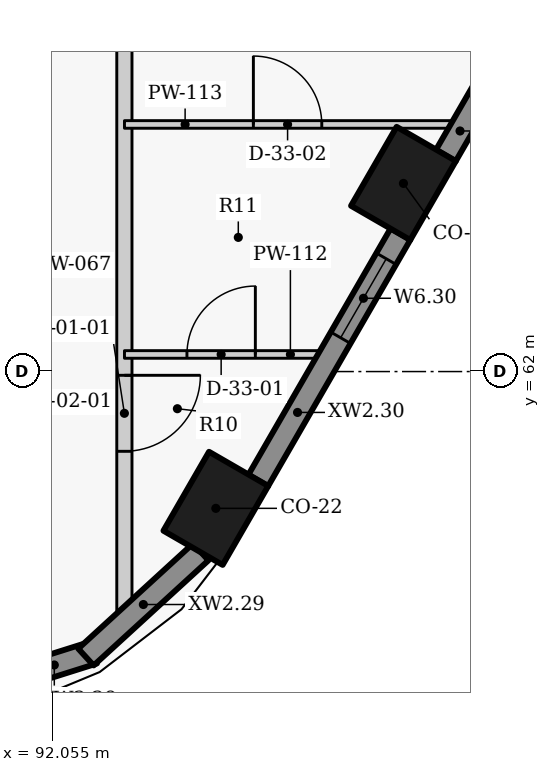
"""IFC4 building model, lengths in metres.
Left out: names, types, materials, properties, quantities, classifications, styles, units other than length and angle.
Written with IfcOpenShell. Run it as: python <this file> out.ifc"""

import sys

from ifc_helpers import new_model, si_unit, direction, frame, frame_2d, origin, origin_2d, place, context, subcontext, project, spatial, rectangle, extrude, element, fill, save


model = new_model("IFC4")
c1 = context("Model", 3, precision=1e-05, world=origin(), true_north=direction((0.0, 1.0)))
c2 = subcontext(c1, "Body", "Model", "MODEL_VIEW")
j1 = project(units=[si_unit("LENGTHUNIT", "METRE"), si_unit("PLANEANGLEUNIT", "RADIAN")], contexts=[c1])
p1 = place(None, origin())
s1 = spatial("IfcSite", under=j1, at=p1, CompositionType="ELEMENT")
p2 = place(p1, origin())
s2 = spatial("IfcBuilding", under=s1, at=p2, CompositionType="ELEMENT")
p3 = place(p2, frame((0.0, 0.0, 183.3)))
s3 = spatial("IfcBuildingStorey", under=s2, at=p3, CompositionType="ELEMENT", Elevation=183.3)
for number, where, z_axis, x_axis in (
    (1, (94.203, 60.2, 0.0), (0.0, 0.0, 1.0), (0.5, 0.866, 0.0)),
    (2, (96.671, 64.475, 0.0), (0.0, 0.0, 1.0), (0.5, 0.866, 0.0)),
):
    element("IfcColumn", number, at=place(p3, frame(where, z_axis=z_axis, x_axis=x_axis)), inside=s3, PredefinedType="COLUMN", context=c2, shape_type="SweptSolid", body=[
        extrude(rectangle(XDim=1.2, YDim=0.9, at=origin_2d()), origin(), (0.0, 0.0, 1.0), 3.3),
    ])
p4 = place(p3, frame((90.636, 57.685, 0.0), z_axis=(0.0, 0.0, 1.0), x_axis=(0.95368324118, 0.300812691707, 0.0)))
e3 = element("IfcWall", 3, at=p4, inside=s3, PredefinedType="SOLIDWALL", context=c2, shape_type="SweptSolid", body=[
    extrude(rectangle(XDim=2.053, YDim=0.3, at=frame_2d((1.027, 0.0))), origin(), (0.0, 0.0, 1.0), 2.425),
])
p5 = place(p4, frame((0.271, 0.0, 0.9)))
e4 = element("IfcOpeningElement", 4, at=p5, cuts=e3, PredefinedType="OPENING", context=c2, shape_type="SweptSolid", body=[
    extrude(rectangle(XDim=0.6, YDim=1.1, at=frame_2d((0.3, 0.55))), frame((0.0, 0.16, 0.0), z_axis=(0.0, -1.0, 0.0), x_axis=(1.0, 0.0, 0.0)), (0.0, 0.0, 1.0), 0.32),
])
p6 = place(p3, frame((92.494, 58.244, 0.0), z_axis=(0.0, 0.0, 1.0), x_axis=(0.73764876128, 0.675184645102, 0.0)))
e5 = element("IfcWall", 5, at=p6, inside=s3, PredefinedType="SOLIDWALL", context=c2, shape_type="SweptSolid", body=[
    extrude(rectangle(XDim=2.048, YDim=0.3, at=frame_2d((1.024, 0.0))), origin(), (0.0, 0.0, 1.0), 2.425),
])
p7 = place(p3, frame((94.761, 60.567, 0.0), z_axis=(0.0, 0.0, 1.0), x_axis=(0.499982088007, 0.866035745032, 0.0)))
e6 = element("IfcWall", 6, at=p7, inside=s3, PredefinedType="SOLIDWALL", context=c2, shape_type="SweptSolid", body=[
    extrude(rectangle(XDim=3.744, YDim=0.3, at=frame_2d((1.872, 0.0))), origin(), (0.0, 0.0, 1.0), 2.425),
])
p8 = place(p7, frame((2.169, 0.0, 0.9)))
e7 = element("IfcOpeningElement", 7, at=p8, cuts=e6, PredefinedType="OPENING", context=c2, shape_type="SweptSolid", body=[
    extrude(rectangle(XDim=1.2, YDim=1.1, at=frame_2d((0.6, 0.55))), frame((0.0, 0.16, 0.0), z_axis=(0.0, -1.0, 0.0), x_axis=(1.0, 0.0, 0.0)), (0.0, 0.0, 1.0), 0.32),
])
p9 = place(p3, frame((97.229, 64.842, 0.0), z_axis=(0.0, 0.0, 1.0), x_axis=(0.500059225181, 0.86599120741, 0.0)))
e8 = element("IfcWall", 8, at=p9, inside=s3, PredefinedType="SOLIDWALL", context=c2, shape_type="SweptSolid", body=[
    extrude(rectangle(XDim=3.744, YDim=0.3, at=frame_2d((1.872, 0.0))), origin(), (0.0, 0.0, 1.0), 2.425),
])
p10 = place(p9, frame((0.847, 0.0, 0.0)))
e9 = element("IfcOpeningElement", 9, at=p10, cuts=e8, PredefinedType="OPENING", context=c2, shape_type="SweptSolid", body=[
    extrude(rectangle(XDim=2.4, YDim=2.0, at=frame_2d((1.2, 1.0))), frame((0.0, 0.16, 0.0), z_axis=(0.0, -1.0, 0.0), x_axis=(1.0, 0.0, 0.0)), (0.0, 0.0, 1.0), 0.32),
])
p11 = place(p3, frame((93.0, 101.281, 0.0), z_axis=(0.0, 0.0, 1.0), x_axis=(0.0, -1.0, 0.0)))
e10 = element("IfcWall", 10, at=p11, inside=s3, PredefinedType="PARTITIONING", context=c2, shape_type="SweptSolid", body=[
    extrude(rectangle(XDim=42.606, YDim=0.2, at=frame_2d((21.303, 0.0))), origin(), (0.0, 0.0, 1.0), 2.405),
])
p12 = place(p11, frame((39.33, 0.0, 0.0)))
e11 = element("IfcOpeningElement", 11, at=p12, cuts=e10, PredefinedType="OPENING", context=c2, shape_type="SweptSolid", body=[
    extrude(rectangle(XDim=1.0, YDim=2.1, at=frame_2d((0.5, 1.05))), frame((0.0, 0.11, 0.0), z_axis=(0.0, -1.0, 0.0), x_axis=(1.0, 0.0, 0.0)), (0.0, 0.0, 1.0), 0.22),
])
p13 = place(p11, frame((25.005, 0.0, 0.0)))
e12 = element("IfcOpeningElement", 12, at=p13, cuts=e10, PredefinedType="OPENING", context=c2, shape_type="SweptSolid", body=[
    extrude(rectangle(XDim=1.0, YDim=2.1, at=frame_2d((0.5, 1.05))), frame((0.0, 0.11, 0.0), z_axis=(0.0, -1.0, 0.0), x_axis=(1.0, 0.0, 0.0)), (0.0, 0.0, 1.0), 0.22),
])
p14 = place(p11, frame((7.643, 0.0, 0.0)))
e13 = element("IfcOpeningElement", 13, at=p14, cuts=e10, PredefinedType="OPENING", context=c2, shape_type="SweptSolid", body=[
    extrude(rectangle(XDim=1.0, YDim=2.1, at=frame_2d((0.5, 1.05))), frame((0.0, 0.11, 0.0), z_axis=(0.0, -1.0, 0.0), x_axis=(1.0, 0.0, 0.0)), (0.0, 0.0, 1.0), 0.22),
])
p15 = place(p3, frame((93.001, 62.225, 0.0), z_axis=(0.0, 0.0, 1.0), x_axis=(1.0, 0.0, 0.0)))
e14 = element("IfcWall", 14, at=p15, inside=s3, PredefinedType="PARTITIONING", context=c2, shape_type="SweptSolid", body=[
    extrude(rectangle(XDim=2.544, YDim=0.1, at=frame_2d((1.272, 0.0))), origin(), (0.0, 0.0, 1.0), 2.405),
])
p16 = place(p15, frame((0.822, 0.0, 0.0)))
e15 = element("IfcOpeningElement", 15, at=p16, cuts=e14, PredefinedType="OPENING", context=c2, shape_type="SweptSolid", body=[
    extrude(rectangle(XDim=0.9, YDim=2.1, at=frame_2d((0.45, 1.05))), frame((0.0, 0.06, 0.0), z_axis=(0.0, -1.0, 0.0), x_axis=(1.0, 0.0, 0.0)), (0.0, 0.0, 1.0), 0.12),
])
p17 = place(p3, frame((93.001, 65.251, 0.0), z_axis=(0.0, 0.0, 1.0), x_axis=(1.0, 0.0, 0.0)))
e16 = element("IfcWall", 16, at=p17, inside=s3, PredefinedType="PARTITIONING", context=c2, shape_type="SweptSolid", body=[
    extrude(rectangle(XDim=4.291, YDim=0.1, at=frame_2d((2.146, 0.0))), origin(), (0.0, 0.0, 1.0), 2.405),
])
p18 = place(p17, frame((1.696, 0.0, 0.0)))
e17 = element("IfcOpeningElement", 17, at=p18, cuts=e16, PredefinedType="OPENING", context=c2, shape_type="SweptSolid", body=[
    extrude(rectangle(XDim=0.9, YDim=2.1, at=frame_2d((0.45, 1.05))), frame((0.0, 0.06, 0.0), z_axis=(0.0, -1.0, 0.0), x_axis=(1.0, 0.0, 0.0)), (0.0, 0.0, 1.0), 0.12),
])
p19 = place(p8, origin())
e18 = element("IfcWindow", 18, at=p19, inside=s3, PartitioningType="SINGLE_PANEL", PredefinedType="WINDOW", context=c2, shape_type="SweptSolid", body=[
    extrude(rectangle(XDim=1.2, YDim=1.1, at=frame_2d((0.6, 0.55))), frame((0.0, 0.03, 0.0), z_axis=(0.0, -1.0, 0.0), x_axis=(1.0, 0.0, 0.0)), (0.0, 0.0, 1.0), 0.06),
])
fill(e7, e18)
p20 = place(p12, origin())
e19 = element("IfcDoor", 19, at=p20, inside=s3, OperationType="SINGLE_SWING_LEFT", PredefinedType="DOOR", context=c2, shape_type="SweptSolid", body=[
    extrude(rectangle(XDim=1.0, YDim=2.1, at=frame_2d((0.5, 1.05))), frame((0.0, 0.025, 0.0), z_axis=(0.0, -1.0, 0.0), x_axis=(1.0, 0.0, 0.0)), (0.0, 0.0, 1.0), 0.05),
])
fill(e11, e19)
p21 = place(p16, origin())
e20 = element("IfcDoor", 20, at=p21, inside=s3, OperationType="SINGLE_SWING_RIGHT", PredefinedType="DOOR", context=c2, shape_type="SweptSolid", body=[
    extrude(rectangle(XDim=0.9, YDim=2.1, at=frame_2d((0.45, 1.05))), frame((0.0, 0.025, 0.0), z_axis=(0.0, -1.0, 0.0), x_axis=(1.0, 0.0, 0.0)), (0.0, 0.0, 1.0), 0.05),
])
fill(e15, e20)
p22 = place(p18, origin())
e21 = element("IfcDoor", 21, at=p22, inside=s3, OperationType="SINGLE_SWING_LEFT", PredefinedType="DOOR", context=c2, shape_type="SweptSolid", body=[
    extrude(rectangle(XDim=0.9, YDim=2.1, at=frame_2d((0.45, 1.05))), frame((0.0, 0.025, 0.0), z_axis=(0.0, -1.0, 0.0), x_axis=(1.0, 0.0, 0.0)), (0.0, 0.0, 1.0), 0.05),
])
fill(e17, e21)
save(model, sys.argv[1])
